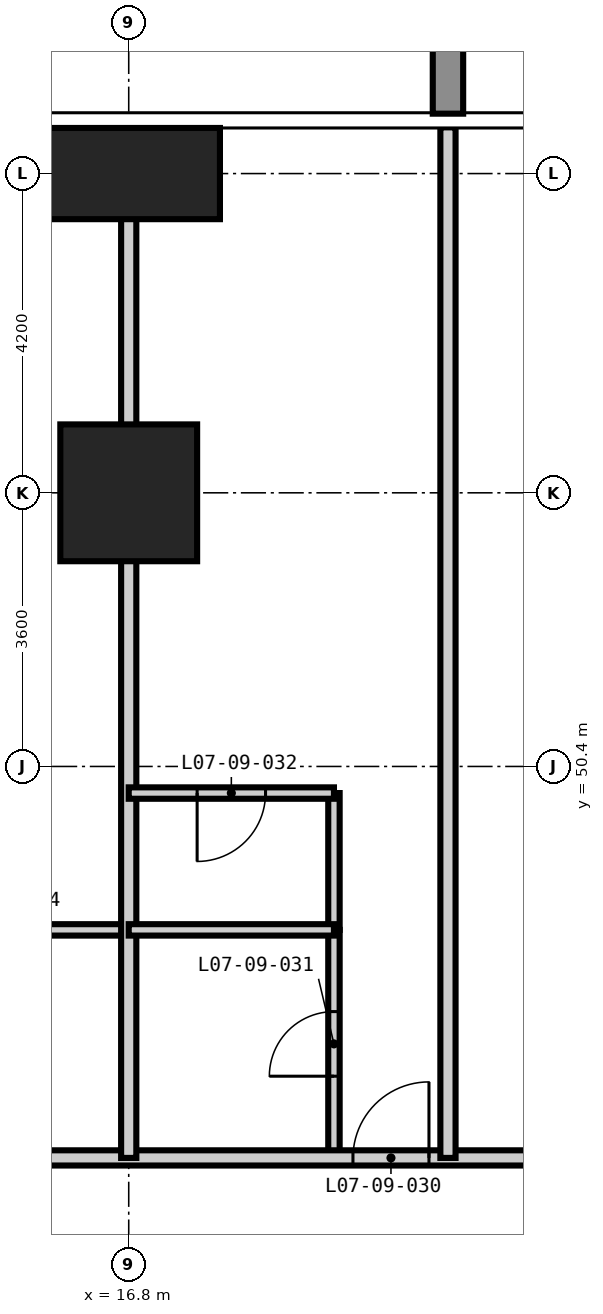
"""IFC4 building model, lengths in metres.
Left out: names, types, materials, properties, quantities, classifications, styles, units other than length and angle.
Written with IfcOpenShell. Run it as: python <this file> out.ifc"""

import sys

from ifc_helpers import new_model, si_unit, direction, frame, frame_2d, origin, origin_2d, place, context, subcontext, project, spatial, rectangle, extrude, element, fill, save


model = new_model("IFC4")
c1 = context("Model", 3, precision=1e-05, world=origin(), true_north=direction((0.0, 1.0)))
c2 = subcontext(c1, "Body", "Model", "MODEL_VIEW")
j1 = project(units=[si_unit("LENGTHUNIT", "METRE"), si_unit("PLANEANGLEUNIT", "RADIAN")], contexts=[c1])
p1 = place(None, origin())
s1 = spatial("IfcSite", under=j1, at=p1, CompositionType="ELEMENT")
p2 = place(p1, origin())
s2 = spatial("IfcBuilding", under=s1, at=p2, CompositionType="ELEMENT")
p3 = place(p2, frame((0.0, 0.0, 34.2)))
s3 = spatial("IfcBuildingStorey", under=s2, at=p3, CompositionType="ELEMENT", Elevation=34.2)
p4 = place(p3, frame((16.8, 54.0, -0.35), z_axis=(0.0, 0.0, 1.0), x_axis=(1.0, 0.0, 0.0)))
e1 = element("IfcColumn", 1, at=p4, inside=s3, PredefinedType="COLUMN", context=c2, shape_type="SweptSolid", body=[
    extrude(rectangle(XDim=1.8, YDim=1.8, at=origin_2d()), origin(), (0.0, 0.0, 1.0), 3.6),
])
p5 = place(p3, frame((16.8, 58.2, -0.35), z_axis=(0.0, 0.0, 1.0), x_axis=(1.0, 0.0, 0.0)))
e2 = element("IfcColumn", 2, at=p5, inside=s3, PredefinedType="COLUMN", context=c2, shape_type="SweptSolid", body=[
    extrude(rectangle(XDim=2.4, YDim=1.2, at=origin_2d()), origin(), (0.0, 0.0, 1.0), 3.6),
])
p6 = place(p3, frame((19.5, 45.25, 0.0), z_axis=(0.0, 0.0, 1.0), x_axis=(0.0, 1.0, 0.0)))
e3 = element("IfcWall", 3, at=p6, inside=s3, PredefinedType="PARTITIONING", context=c2, shape_type="SweptSolid", body=[
    extrude(rectangle(XDim=3.0, YDim=0.15, at=frame_2d((1.5, 0.0))), origin(), (0.0, 0.0, 1.0), 3.25),
])
p7 = place(p6, frame((1.075, 0.0, 0.0)))
e4 = element("IfcOpeningElement", 4, at=p7, cuts=e3, PredefinedType="OPENING", context=c2, shape_type="SweptSolid", body=[
    extrude(rectangle(XDim=0.85, YDim=2.1, at=frame_2d((0.425, 1.05))), frame((0.0, 0.085, 0.0), z_axis=(0.0, -1.0, 0.0), x_axis=(1.0, 0.0, 0.0)), (0.0, 0.0, 1.0), 0.17),
])
p8 = place(p3, frame((13.25, 48.25, 0.0), z_axis=(0.0, 0.0, 1.0), x_axis=(1.0, 0.0, 0.0)))
e5 = element("IfcWall", 5, at=p8, inside=s3, PredefinedType="PARTITIONING", context=c2, shape_type="SweptSolid", body=[
    extrude(rectangle(XDim=3.55, YDim=0.15, at=frame_2d((1.775, 0.0))), origin(), (0.0, 0.0, 1.0), 3.25),
])
p9 = place(p8, frame((1.35, 0.0, 0.0)))
e6 = element("IfcOpeningElement", 6, at=p9, cuts=e5, PredefinedType="OPENING", context=c2, shape_type="SweptSolid", body=[
    extrude(rectangle(XDim=0.85, YDim=2.1, at=frame_2d((0.425, 1.05))), frame((0.0, 0.085, 0.0), z_axis=(0.0, -1.0, 0.0), x_axis=(1.0, 0.0, 0.0)), (0.0, 0.0, 1.0), 0.17),
])
p10 = place(p3, frame((13.25, 45.25, 0.0), z_axis=(0.0, 0.0, 1.0), x_axis=(1.0, 0.0, 0.0)))
e7 = element("IfcWall", 7, at=p10, inside=s3, PredefinedType="PARTITIONING", context=c2, shape_type="SweptSolid", body=[
    extrude(rectangle(XDim=32.6, YDim=0.2, at=frame_2d((16.3, 0.0))), origin(), (0.0, 0.0, 1.0), 3.25),
])
p11 = place(p10, frame((6.5, 0.0, 0.0)))
e8 = element("IfcOpeningElement", 8, at=p11, cuts=e7, PredefinedType="OPENING", context=c2, shape_type="SweptSolid", body=[
    extrude(rectangle(XDim=1.0, YDim=2.2, at=frame_2d((0.5, 1.1))), frame((0.0, 0.11, 0.0), z_axis=(0.0, -1.0, 0.0), x_axis=(1.0, 0.0, 0.0)), (0.0, 0.0, 1.0), 0.22),
])
p12 = place(p10, frame((11.45, 0.0, 0.0)))
e9 = element("IfcOpeningElement", 9, at=p12, cuts=e7, PredefinedType="OPENING", context=c2, shape_type="SweptSolid", body=[
    extrude(rectangle(XDim=1.0, YDim=2.2, at=frame_2d((0.5, 1.1))), frame((0.0, 0.11, 0.0), z_axis=(0.0, -1.0, 0.0), x_axis=(1.0, 0.0, 0.0)), (0.0, 0.0, 1.0), 0.22),
])
p13 = place(p10, frame((19.85, 0.0, 0.0)))
e10 = element("IfcOpeningElement", 10, at=p13, cuts=e7, PredefinedType="OPENING", context=c2, shape_type="SweptSolid", body=[
    extrude(rectangle(XDim=1.0, YDim=2.2, at=frame_2d((0.5, 1.1))), frame((0.0, 0.11, 0.0), z_axis=(0.0, -1.0, 0.0), x_axis=(1.0, 0.0, 0.0)), (0.0, 0.0, 1.0), 0.22),
])
p14 = place(p10, frame((24.8, 0.0, 0.0)))
e11 = element("IfcOpeningElement", 11, at=p14, cuts=e7, PredefinedType="OPENING", context=c2, shape_type="SweptSolid", body=[
    extrude(rectangle(XDim=1.0, YDim=2.2, at=frame_2d((0.5, 1.1))), frame((0.0, 0.11, 0.0), z_axis=(0.0, -1.0, 0.0), x_axis=(1.0, 0.0, 0.0)), (0.0, 0.0, 1.0), 0.22),
])
for number, where, z_axis, x_axis in (
    (12, (16.8, 45.25, 0.0), (0.0, 0.0, 1.0), (0.0, 1.0, 0.0)),
    (13, (21.0, 45.25, 0.0), (0.0, 0.0, 1.0), (0.0, 1.0, 0.0)),
):
    element("IfcWall", number, at=place(p3, frame(where, z_axis=z_axis, x_axis=x_axis)), inside=s3, PredefinedType="PARTITIONING", context=c2, shape_type="SweptSolid", body=[
        extrude(rectangle(XDim=13.558, YDim=0.2, at=frame_2d((6.779, 0.0))), origin(), (0.0, 0.0, 1.0), 3.25),
    ])
p15 = place(p3, frame((19.5, 48.25, 0.0), z_axis=(0.0, 0.0, 1.0), x_axis=(0.0, 1.0, 0.0)))
e14 = element("IfcWall", 14, at=p15, inside=s3, PredefinedType="PARTITIONING", context=c2, shape_type="SweptSolid", body=[
    extrude(rectangle(XDim=1.8, YDim=0.15, at=frame_2d((0.9, 0.0))), origin(), (0.0, 0.0, 1.0), 3.25),
])
p16 = place(p3, frame((16.8, 48.25, 0.0), z_axis=(0.0, 0.0, 1.0), x_axis=(1.0, 0.0, 0.0)))
e15 = element("IfcWall", 15, at=p16, inside=s3, PredefinedType="PARTITIONING", context=c2, shape_type="SweptSolid", body=[
    extrude(rectangle(XDim=2.7, YDim=0.15, at=frame_2d((1.35, 0.0))), origin(), (0.0, 0.0, 1.0), 3.25),
])
p17 = place(p3, frame((16.8, 50.05, 0.0), z_axis=(0.0, 0.0, 1.0), x_axis=(1.0, 0.0, 0.0)))
e16 = element("IfcWall", 16, at=p17, inside=s3, PredefinedType="PARTITIONING", context=c2, shape_type="SweptSolid", body=[
    extrude(rectangle(XDim=2.7, YDim=0.15, at=frame_2d((1.35, 0.0))), origin(), (0.0, 0.0, 1.0), 3.25),
])
p18 = place(p17, frame((0.9, 0.0, 0.0)))
e17 = element("IfcOpeningElement", 17, at=p18, cuts=e16, PredefinedType="OPENING", context=c2, shape_type="SweptSolid", body=[
    extrude(rectangle(XDim=0.9, YDim=2.1, at=frame_2d((0.45, 1.05))), frame((0.0, 0.085, 0.0), z_axis=(0.0, -1.0, 0.0), x_axis=(1.0, 0.0, 0.0)), (0.0, 0.0, 1.0), 0.17),
])
p19 = place(p11, origin())
e18 = element("IfcDoor", 18, at=p19, inside=s3, OperationType="SINGLE_SWING_RIGHT", PredefinedType="DOOR", context=c2, shape_type="SweptSolid", body=[
    extrude(rectangle(XDim=1.0, YDim=2.2, at=frame_2d((0.5, 1.1))), frame((0.0, 0.025, 0.0), z_axis=(0.0, -1.0, 0.0), x_axis=(1.0, 0.0, 0.0)), (0.0, 0.0, 1.0), 0.05),
])
fill(e8, e18)
p20 = place(p7, origin())
e19 = element("IfcDoor", 19, at=p20, inside=s3, OperationType="SINGLE_SWING_LEFT", PredefinedType="DOOR", context=c2, shape_type="SweptSolid", body=[
    extrude(rectangle(XDim=0.85, YDim=2.1, at=frame_2d((0.425, 1.05))), frame((0.0, 0.025, 0.0), z_axis=(0.0, -1.0, 0.0), x_axis=(1.0, 0.0, 0.0)), (0.0, 0.0, 1.0), 0.05),
])
fill(e4, e19)
p21 = place(p18, frame((0.9, 0.0, 0.0), z_axis=(0.0, 0.0, 1.0), x_axis=(-1.0, 0.0, 0.0)))
e20 = element("IfcDoor", 20, at=p21, inside=s3, OperationType="SINGLE_SWING_RIGHT", PredefinedType="DOOR", context=c2, shape_type="SweptSolid", body=[
    extrude(rectangle(XDim=0.9, YDim=2.1, at=frame_2d((0.45, 1.05))), frame((0.0, 0.025, 0.0), z_axis=(0.0, -1.0, 0.0), x_axis=(1.0, 0.0, 0.0)), (0.0, 0.0, 1.0), 0.05),
])
fill(e17, e20)
save(model, sys.argv[1])
